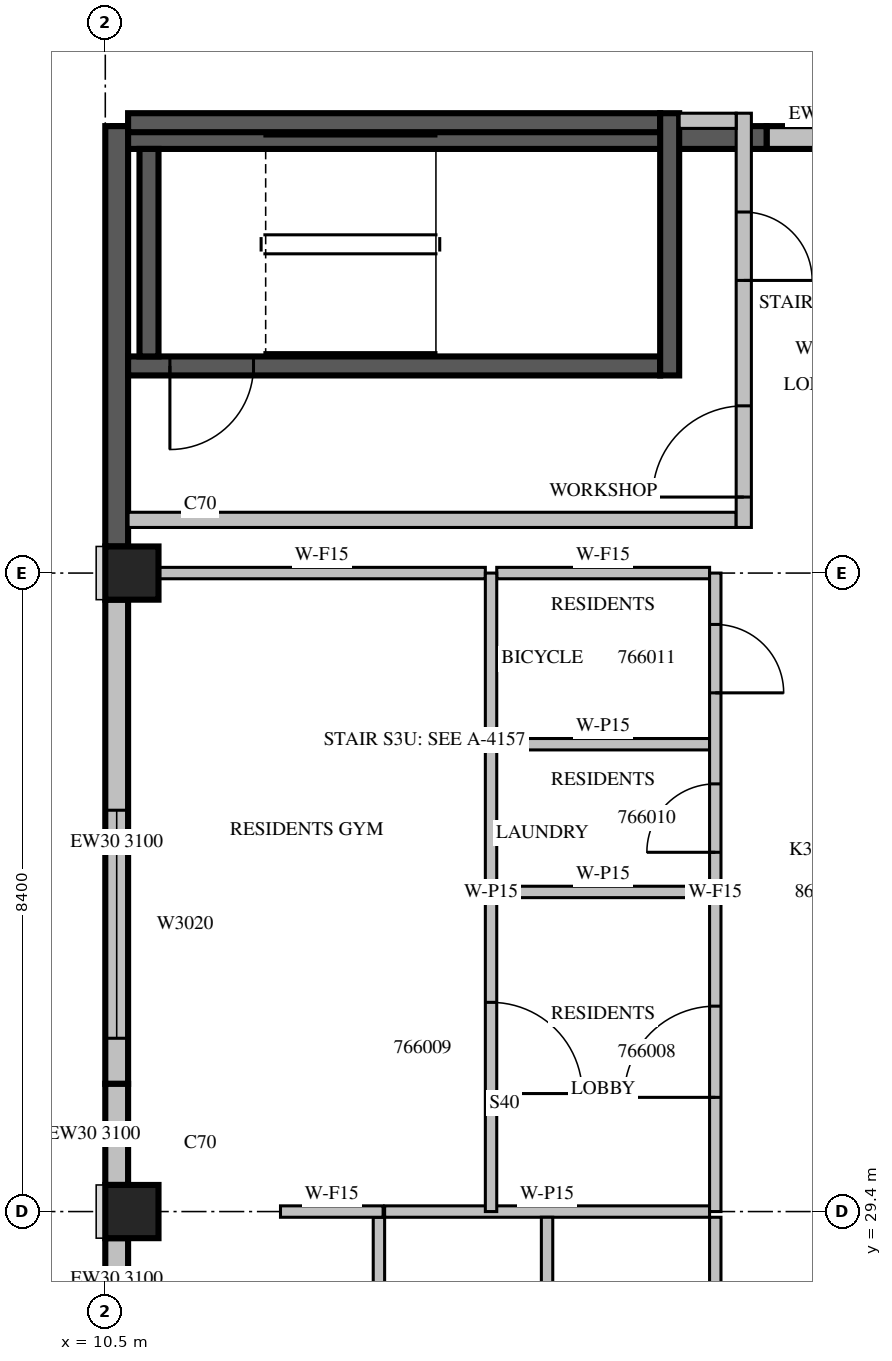
"""IFC4 building model, lengths in metres.
Left out: names, types, materials, properties, quantities, classifications, styles, units other than length and angle.
Written with IfcOpenShell. Run it as: python <this file> out.ifc"""

import sys

from ifc_helpers import new_model, si_unit, direction, frame, frame_2d, origin, origin_2d, place, context, subcontext, project, spatial, rectangle, extrude, source, transform, mapped, element, fill, save


model = new_model("IFC4")
c1 = context("Model", 3, precision=1e-05, world=origin(), true_north=direction((0.0, 1.0)))
c2 = subcontext(c1, "Body", "Model", "MODEL_VIEW")
j1 = project(units=[si_unit("LENGTHUNIT", "METRE"), si_unit("PLANEANGLEUNIT", "RADIAN")], contexts=[c1])
p1 = place(None, origin())
s1 = spatial("IfcSite", under=j1, at=p1, CompositionType="ELEMENT")
p2 = place(p1, origin())
s2 = spatial("IfcBuilding", under=s1, at=p2, CompositionType="ELEMENT")
p3 = place(p2, frame((0.0, 0.0, 291.5)))
s3 = spatial("IfcBuildingStorey", under=s2, at=p3, CompositionType="ELEMENT", Elevation=291.5)
m1 = source(origin(), c2, "Body", "SweptSolid", [
    extrude(rectangle(XDim=0.7, YDim=0.7, at=origin_2d()), origin(), (0.0, 0.0, 1.0), 3.5),
])
for number, where, z_axis, x_axis in (
    (1, (10.85, 29.4, 0.0), (0.0, 0.0, 1.0), (1.0, 0.0, 0.0)),
    (2, (10.85, 37.8, 0.0), (0.0, 0.0, 1.0), (1.0, 0.0, 0.0)),
):
    element("IfcColumn", number, at=place(p3, frame(where, z_axis=z_axis, x_axis=x_axis)), inside=s3, PredefinedType="COLUMN", context=c2, shape_type="MappedRepresentation", body=[
        mapped(m1, transform((0.0, 0.0, 0.0), scale=1.0)),
    ])
m2 = source(origin(), c2, "Body", "SweptSolid", [
    extrude(rectangle(XDim=1.8, YDim=0.3, at=frame_2d((0.9, 0.0))), origin(), (0.0, 0.0, 1.0), 3.1),
])
p4 = place(p3, frame((21.0, 43.53, 0.0), z_axis=(0.0, 0.0, 1.0), x_axis=(-1.0, 0.0, 0.0)))
e3 = element("IfcWall", 3, at=p4, inside=s3, PredefinedType="STANDARD", context=c2, shape_type="MappedRepresentation", body=[
    mapped(m2, transform((0.0, 0.0, 0.0), scale=1.0)),
])
m3 = source(origin(), c2, "Body", "SweptSolid", [
    extrude(rectangle(XDim=8.6, YDim=0.3, at=frame_2d((4.3, 0.0))), origin(), (0.0, 0.0, 1.0), 3.1),
])
p5 = place(p3, frame((19.2, 43.53, 0.0), z_axis=(0.0, 0.0, 1.0), x_axis=(-1.0, 0.0, 0.0)))
e4 = element("IfcWall", 4, at=p5, inside=s3, PredefinedType="SOLIDWALL", context=c2, shape_type="MappedRepresentation", body=[
    mapped(m3, transform((0.0, 0.0, 0.0), scale=1.0)),
])
m4 = source(origin(), c2, "Body", "SweptSolid", [
    extrude(rectangle(XDim=5.53, YDim=0.3, at=frame_2d((2.765, 0.0))), origin(), (0.0, 0.0, 1.0), 3.1),
])
p6 = place(p3, frame((10.65, 43.68, 0.0), z_axis=(0.0, 0.0, 1.0), x_axis=(0.0, -1.0, 0.0)))
e5 = element("IfcWall", 5, at=p6, inside=s3, PredefinedType="SOLIDWALL", context=c2, shape_type="MappedRepresentation", body=[
    mapped(m4, transform((0.0, 0.0, 0.0), scale=1.0)),
])
m5 = source(origin(), c2, "Body", "SweptSolid", [
    extrude(rectangle(XDim=6.37, YDim=0.3, at=frame_2d((3.185, 0.0))), origin(), (0.0, 0.0, 1.0), 3.1),
])
p7 = place(p3, frame((10.65, 37.45, 0.0), z_axis=(0.0, 0.0, 1.0), x_axis=(0.0, -1.0, 0.0)))
e6 = element("IfcWall", 6, at=p7, inside=s3, PredefinedType="STANDARD", context=c2, shape_type="MappedRepresentation", body=[
    mapped(m5, transform((0.0, 0.0, 0.0), scale=1.0)),
])
m6 = source(origin(), c2, "Body", "SweptSolid", [
    extrude(rectangle(XDim=3.0, YDim=2.0, at=frame_2d((1.5, 1.0))), frame((0.0, 0.16, 0.0), z_axis=(0.0, -1.0, 0.0), x_axis=(1.0, 0.0, 0.0)), (0.0, 0.0, 1.0), 0.32),
])
p8 = place(p7, frame((2.77, 0.0, 0.6)))
e7 = element("IfcOpeningElement", 7, at=p8, cuts=e6, PredefinedType="OPENING", context=c2, shape_type="MappedRepresentation", body=[
    mapped(m6, transform((0.0, 0.0, 0.0), scale=1.0)),
])
m7 = source(origin(), c2, "Body", "SweptSolid", [
    extrude(rectangle(XDim=1.33, YDim=0.3, at=frame_2d((0.665, 0.0))), origin(), (0.0, 0.0, 1.0), 3.1),
])
p9 = place(p3, frame((10.65, 31.08, 0.0), z_axis=(0.0, 0.0, 1.0), x_axis=(0.0, -1.0, 0.0)))
e8 = element("IfcWall", 8, at=p9, inside=s3, PredefinedType="STANDARD", context=c2, shape_type="MappedRepresentation", body=[
    mapped(m7, transform((0.0, 0.0, 0.0), scale=1.0)),
])
m8 = source(origin(), c2, "Body", "SweptSolid", [
    extrude(rectangle(XDim=2.17, YDim=0.3, at=frame_2d((1.085, 0.0))), origin(), (0.0, 0.0, 1.0), 3.1),
])
p10 = place(p3, frame((10.65, 29.05, 0.0), z_axis=(0.0, 0.0, 1.0), x_axis=(0.0, -1.0, 0.0)))
e9 = element("IfcWall", 9, at=p10, inside=s3, PredefinedType="STANDARD", context=c2, shape_type="MappedRepresentation", body=[
    mapped(m8, transform((0.0, 0.0, 0.0), scale=1.0)),
])
m9 = source(origin(), c2, "Body", "SweptSolid", [
    extrude(rectangle(XDim=1.2, YDim=2.0, at=frame_2d((0.6, 1.0))), frame((0.0, 0.16, 0.0), z_axis=(0.0, -1.0, 0.0), x_axis=(1.0, 0.0, 0.0)), (0.0, 0.0, 1.0), 0.32),
])
p11 = place(p10, frame((0.485, 0.0, 0.6)))
e10 = element("IfcOpeningElement", 10, at=p11, cuts=e9, PredefinedType="OPENING", context=c2, shape_type="MappedRepresentation", body=[
    mapped(m9, transform((0.0, 0.0, 0.0), scale=1.0)),
])
m10 = source(origin(), c2, "Body", "SweptSolid", [
    extrude(rectangle(XDim=7.0, YDim=0.25, at=frame_2d((3.5, 0.0))), origin(), (0.0, 0.0, 1.0), 3.1),
])
p12 = place(p3, frame((10.8, 40.525, 0.0), z_axis=(0.0, 0.0, 1.0), x_axis=(1.0, 0.0, 0.0)))
e11 = element("IfcWall", 11, at=p12, inside=s3, PredefinedType="SOLIDWALL", context=c2, shape_type="MappedRepresentation", body=[
    mapped(m10, transform((0.0, 0.0, 0.0), scale=1.0)),
])
m11 = source(origin(), c2, "Body", "SweptSolid", [
    extrude(rectangle(XDim=1.1, YDim=2.1, at=frame_2d((0.55, 1.05))), frame((0.0, 0.135, 0.0), z_axis=(0.0, -1.0, 0.0), x_axis=(1.0, 0.0, 0.0)), (0.0, 0.0, 1.0), 0.27),
])
p13 = place(p12, frame((0.55, 0.0, 0.0)))
e12 = element("IfcOpeningElement", 12, at=p13, cuts=e11, PredefinedType="OPENING", context=c2, shape_type="MappedRepresentation", body=[
    mapped(m11, transform((0.0, 0.0, 0.0), scale=1.0)),
])
p14 = place(p3, frame((10.8, 43.725, 0.0), z_axis=(0.0, 0.0, 1.0), x_axis=(1.0, 0.0, 0.0)))
e13 = element("IfcWall", 13, at=p14, inside=s3, PredefinedType="SOLIDWALL", context=c2, shape_type="MappedRepresentation", body=[
    mapped(m10, transform((0.0, 0.0, 0.0), scale=1.0)),
])
m12 = source(origin(), c2, "Body", "SweptSolid", [
    extrude(rectangle(XDim=3.45, YDim=0.25, at=frame_2d((1.725, 0.0))), origin(), (0.0, 0.0, 1.0), 3.1),
])
p15 = place(p3, frame((17.925, 40.4, 0.0), z_axis=(0.0, 0.0, 1.0), x_axis=(0.0, 1.0, 0.0)))
e14 = element("IfcWall", 14, at=p15, inside=s3, PredefinedType="SOLIDWALL", context=c2, shape_type="MappedRepresentation", body=[
    mapped(m12, transform((0.0, 0.0, 0.0), scale=1.0)),
])
m13 = source(origin(), c2, "Body", "SweptSolid", [
    extrude(rectangle(XDim=2.73, YDim=0.25, at=frame_2d((1.365, 0.0))), origin(), (0.0, 0.0, 1.0), 3.1),
])
p16 = place(p3, frame((11.075, 40.65, 0.0), z_axis=(0.0, 0.0, 1.0), x_axis=(0.0, 1.0, 0.0)))
e15 = element("IfcWall", 15, at=p16, inside=s3, PredefinedType="SOLIDWALL", context=c2, shape_type="MappedRepresentation", body=[
    mapped(m13, transform((0.0, 0.0, 0.0), scale=1.0)),
])
m14 = source(origin(), c2, "Body", "SweptSolid", [
    extrude(rectangle(XDim=8.0, YDim=0.2, at=frame_2d((4.0, 0.0))), origin(), (0.0, 0.0, 1.0), 3.1),
])
p17 = place(p3, frame((10.8, 38.5, 0.0), z_axis=(0.0, 0.0, 1.0), x_axis=(1.0, 0.0, 0.0)))
e16 = element("IfcWall", 16, at=p17, inside=s3, PredefinedType="PARTITIONING", context=c2, shape_type="MappedRepresentation", body=[
    mapped(m14, transform((0.0, 0.0, 0.0), scale=1.0)),
])
m15 = source(origin(), c2, "Body", "SweptSolid", [
    extrude(rectangle(XDim=5.45, YDim=0.2, at=frame_2d((2.725, 0.0))), origin(), (0.0, 0.0, 1.0), 3.1),
])
p18 = place(p3, frame((18.9, 38.4, 0.0), z_axis=(0.0, 0.0, 1.0), x_axis=(0.0, 1.0, 0.0)))
e17 = element("IfcWall", 17, at=p18, inside=s3, PredefinedType="PARTITIONING", context=c2, shape_type="MappedRepresentation", body=[
    mapped(m15, transform((0.0, 0.0, 0.0), scale=1.0)),
])
m16 = source(origin(), c2, "Body", "SweptSolid", [
    extrude(rectangle(XDim=1.2, YDim=2.1, at=frame_2d((0.6, 1.05))), frame((0.0, 0.11, 0.0), z_axis=(0.0, -1.0, 0.0), x_axis=(1.0, 0.0, 0.0)), (0.0, 0.0, 1.0), 0.22),
])
p19 = place(p18, frame((0.4, 0.0, 0.0)))
e18 = element("IfcOpeningElement", 18, at=p19, cuts=e17, PredefinedType="OPENING", context=c2, shape_type="MappedRepresentation", body=[
    mapped(m16, transform((0.0, 0.0, 0.0), scale=1.0)),
])
m17 = source(origin(), c2, "Body", "SweptSolid", [
    extrude(rectangle(XDim=0.9, YDim=2.1, at=frame_2d((0.45, 1.05))), frame((0.0, 0.11, 0.0), z_axis=(0.0, -1.0, 0.0), x_axis=(1.0, 0.0, 0.0)), (0.0, 0.0, 1.0), 0.22),
])
p20 = place(p18, frame((3.25, 0.0, 0.0)))
e19 = element("IfcOpeningElement", 19, at=p20, cuts=e17, PredefinedType="OPENING", context=c2, shape_type="MappedRepresentation", body=[
    mapped(m17, transform((0.0, 0.0, 0.0), scale=1.0)),
])
m18 = source(origin(), c2, "Body", "SweptSolid", [
    extrude(rectangle(XDim=0.75, YDim=0.2, at=frame_2d((0.375, 0.0))), origin(), (0.0, 0.0, 1.0), 3.1),
])
p21 = place(p3, frame((18.05, 43.75, 0.0), z_axis=(0.0, 0.0, 1.0), x_axis=(1.0, 0.0, 0.0)))
e20 = element("IfcWall", 20, at=p21, inside=s3, PredefinedType="PARTITIONING", context=c2, shape_type="MappedRepresentation", body=[
    mapped(m18, transform((0.0, 0.0, 0.0), scale=1.0)),
])
m19 = source(origin(), c2, "Body", "SweptSolid", [
    extrude(rectangle(XDim=4.275, YDim=0.15, at=frame_2d((2.138, 0.0))), origin(), (0.0, 0.0, 1.0), 3.1),
])
p22 = place(p3, frame((18.45, 29.4, 0.0), z_axis=(0.0, 0.0, 1.0), x_axis=(-1.0, 0.0, 0.0)))
e21 = element("IfcWall", 21, at=p22, inside=s3, PredefinedType="PARTITIONING", context=c2, shape_type="MappedRepresentation", body=[
    mapped(m19, transform((0.0, 0.0, 0.0), scale=1.0)),
])
m20 = source(origin(), c2, "Body", "SweptSolid", [
    extrude(rectangle(XDim=5.75, YDim=0.15, at=frame_2d((2.875, 0.0))), origin(), (0.0, 0.0, 1.0), 3.1),
])
p23 = place(p3, frame((18.525, 23.575, 0.0), z_axis=(0.0, 0.0, 1.0), x_axis=(0.0, 1.0, 0.0)))
e22 = element("IfcWall", 22, at=p23, inside=s3, PredefinedType="PARTITIONING", context=c2, shape_type="MappedRepresentation", body=[
    mapped(m20, transform((0.0, 0.0, 0.0), scale=1.0)),
])
m21 = source(origin(), c2, "Body", "SweptSolid", [
    extrude(rectangle(XDim=1.0, YDim=2.1, at=frame_2d((0.5, 1.05))), frame((0.0, 0.085, 0.0), z_axis=(0.0, -1.0, 0.0), x_axis=(1.0, 0.0, 0.0)), (0.0, 0.0, 1.0), 0.17),
])
p24 = place(p23, frame((2.375, 0.0, 0.0)))
e23 = element("IfcOpeningElement", 23, at=p24, cuts=e22, PredefinedType="OPENING", context=c2, shape_type="MappedRepresentation", body=[
    mapped(m21, transform((0.0, 0.0, 0.0), scale=1.0)),
])
p25 = place(p3, frame((16.312, 23.575, 0.0), z_axis=(0.0, 0.0, 1.0), x_axis=(0.0, 1.0, 0.0)))
e24 = element("IfcWall", 24, at=p25, inside=s3, PredefinedType="PARTITIONING", context=c2, shape_type="MappedRepresentation", body=[
    mapped(m20, transform((0.0, 0.0, 0.0), scale=1.0)),
])
m22 = source(origin(), c2, "Body", "SweptSolid", [
    extrude(rectangle(XDim=7.725, YDim=0.15, at=frame_2d((3.862, 0.0))), origin(), (0.0, 0.0, 1.0), 3.1),
])
p26 = place(p3, frame((14.1, 29.325, 0.0), z_axis=(0.0, 0.0, 1.0), x_axis=(0.0, -1.0, 0.0)))
e25 = element("IfcWall", 25, at=p26, inside=s3, PredefinedType="PARTITIONING", context=c2, shape_type="MappedRepresentation", body=[
    mapped(m22, transform((0.0, 0.0, 0.0), scale=1.0)),
])
p27 = place(p26, frame((6.275, 0.0, 0.0)))
e26 = element("IfcOpeningElement", 26, at=p27, cuts=e25, PredefinedType="OPENING", context=c2, shape_type="MappedRepresentation", body=[
    mapped(m21, transform((0.0, 0.0, 0.0), scale=1.0)),
])
p28 = place(p3, frame((18.45, 33.605, 0.0), z_axis=(0.0, 0.0, 1.0), x_axis=(-1.0, 0.0, 0.0)))
e27 = element("IfcWall", 27, at=p28, inside=s3, PredefinedType="PARTITIONING", context=c2, shape_type="SweptSolid", body=[
    extrude(rectangle(XDim=2.8, YDim=0.15, at=frame_2d((1.4, 0.0))), origin(), (0.0, 0.0, 1.0), 3.1),
])
m23 = source(origin(), c2, "Body", "SweptSolid", [
    extrude(rectangle(XDim=2.8, YDim=0.15, at=frame_2d((1.4, 0.0))), origin(), (0.0, 0.0, 1.0), 3.1),
])
p29 = place(p3, frame((18.45, 35.548, 0.0), z_axis=(0.0, 0.0, 1.0), x_axis=(-1.0, 0.0, 0.0)))
e28 = element("IfcWall", 28, at=p29, inside=s3, PredefinedType="PARTITIONING", context=c2, shape_type="MappedRepresentation", body=[
    mapped(m23, transform((0.0, 0.0, 0.0), scale=1.0)),
])
m24 = source(origin(), c2, "Body", "SweptSolid", [
    extrude(rectangle(XDim=1.35, YDim=0.15, at=frame_2d((0.675, 0.0))), origin(), (0.0, 0.0, 1.0), 3.1),
])
p30 = place(p3, frame((14.155, 29.4, 0.0), z_axis=(0.0, 0.0, 1.0), x_axis=(-1.0, 0.0, 0.0)))
e29 = element("IfcWall", 29, at=p30, inside=s3, PredefinedType="PARTITIONING", context=c2, shape_type="MappedRepresentation", body=[
    mapped(m24, transform((0.0, 0.0, 0.0), scale=1.0)),
])
m25 = source(origin(), c2, "Body", "SweptSolid", [
    extrude(rectangle(XDim=4.301, YDim=0.15, at=frame_2d((2.151, 0.0))), origin(), (0.0, 0.0, 1.0), 3.1),
])
p31 = place(p3, frame((15.5, 37.8, 0.0), z_axis=(0.0, 0.0, 1.0), x_axis=(-1.0, 0.0, 0.0)))
e30 = element("IfcWall", 30, at=p31, inside=s3, PredefinedType="PARTITIONING", context=c2, shape_type="MappedRepresentation", body=[
    mapped(m25, transform((0.0, 0.0, 0.0), scale=1.0)),
])
p32 = place(p3, frame((18.45, 37.8, 0.0), z_axis=(0.0, 0.0, 1.0), x_axis=(-1.0, 0.0, 0.0)))
e31 = element("IfcWall", 31, at=p32, inside=s3, PredefinedType="PARTITIONING", context=c2, shape_type="MappedRepresentation", body=[
    mapped(m23, transform((0.0, 0.0, 0.0), scale=1.0)),
])
m26 = source(origin(), c2, "Body", "SweptSolid", [
    extrude(rectangle(XDim=8.4, YDim=0.15, at=frame_2d((4.2, 0.0))), origin(), (0.0, 0.0, 1.0), 3.1),
])
p33 = place(p3, frame((15.575, 29.4, 0.0), z_axis=(0.0, 0.0, 1.0), x_axis=(0.0, 1.0, 0.0)))
e32 = element("IfcWall", 32, at=p33, inside=s3, PredefinedType="PARTITIONING", context=c2, shape_type="MappedRepresentation", body=[
    mapped(m26, transform((0.0, 0.0, 0.0), scale=1.0)),
])
m27 = source(origin(), c2, "Body", "SweptSolid", [
    extrude(rectangle(XDim=1.2, YDim=2.1, at=frame_2d((0.6, 1.05))), frame((0.0, 0.085, 0.0), z_axis=(0.0, -1.0, 0.0), x_axis=(1.0, 0.0, 0.0)), (0.0, 0.0, 1.0), 0.17),
])
p34 = place(p33, frame((1.552, 0.0, 0.0)))
e33 = element("IfcOpeningElement", 33, at=p34, cuts=e32, PredefinedType="OPENING", context=c2, shape_type="MappedRepresentation", body=[
    mapped(m27, transform((0.0, 0.0, 0.0), scale=1.0)),
])
p35 = place(p3, frame((18.525, 29.4, 0.0), z_axis=(0.0, 0.0, 1.0), x_axis=(0.0, 1.0, 0.0)))
e34 = element("IfcWall", 34, at=p35, inside=s3, PredefinedType="PARTITIONING", context=c2, shape_type="MappedRepresentation", body=[
    mapped(m26, transform((0.0, 0.0, 0.0), scale=1.0)),
])
p36 = place(p35, frame((1.502, 0.0, 0.0)))
e35 = element("IfcOpeningElement", 35, at=p36, cuts=e34, PredefinedType="OPENING", context=c2, shape_type="MappedRepresentation", body=[
    mapped(m27, transform((0.0, 0.0, 0.0), scale=1.0)),
])
m28 = source(origin(), c2, "Body", "SweptSolid", [
    extrude(rectangle(XDim=0.9, YDim=2.1, at=frame_2d((0.45, 1.05))), frame((0.0, 0.085, 0.0), z_axis=(0.0, -1.0, 0.0), x_axis=(1.0, 0.0, 0.0)), (0.0, 0.0, 1.0), 0.17),
])
p37 = place(p35, frame((4.727, 0.0, 0.0)))
e36 = element("IfcOpeningElement", 36, at=p37, cuts=e34, PredefinedType="OPENING", context=c2, shape_type="MappedRepresentation", body=[
    mapped(m28, transform((0.0, 0.0, 0.0), scale=1.0)),
])
p38 = place(p35, frame((6.824, 0.0, 0.0)))
e37 = element("IfcOpeningElement", 37, at=p38, cuts=e34, PredefinedType="OPENING", context=c2, shape_type="MappedRepresentation", body=[
    mapped(m28, transform((0.0, 0.0, 0.0), scale=1.0)),
])
m29 = source(origin(), c2, "Body", "SweptSolid", [
    extrude(rectangle(XDim=3.0, YDim=2.0, at=frame_2d((1.5, 1.0))), frame((0.0, 0.03, 0.0), z_axis=(0.0, -1.0, 0.0), x_axis=(1.0, 0.0, 0.0)), (0.0, 0.0, 1.0), 0.06),
])
p39 = place(p8, origin())
e38 = element("IfcWindow", 38, at=p39, inside=s3, PartitioningType="SINGLE_PANEL", PredefinedType="WINDOW", context=c2, shape_type="MappedRepresentation", body=[
    mapped(m29, transform((0.0, 0.0, 0.0), scale=1.0)),
])
fill(e7, e38)
m30 = source(origin(), c2, "Body", "SweptSolid", [
    extrude(rectangle(XDim=1.2, YDim=2.0, at=frame_2d((0.6, 1.0))), frame((0.0, 0.03, 0.0), z_axis=(0.0, -1.0, 0.0), x_axis=(1.0, 0.0, 0.0)), (0.0, 0.0, 1.0), 0.06),
])
p40 = place(p11, origin())
e39 = element("IfcWindow", 39, at=p40, inside=s3, PartitioningType="SINGLE_PANEL", PredefinedType="WINDOW", context=c2, shape_type="MappedRepresentation", body=[
    mapped(m30, transform((0.0, 0.0, 0.0), scale=1.0)),
])
fill(e10, e39)
m31 = source(origin(), c2, "Body", "SweptSolid", [
    extrude(rectangle(XDim=1.1, YDim=2.1, at=frame_2d((0.55, 1.05))), frame((0.0, 0.025, 0.0), z_axis=(0.0, -1.0, 0.0), x_axis=(1.0, 0.0, 0.0)), (0.0, 0.0, 1.0), 0.05),
])
p41 = place(p13, origin())
e40 = element("IfcDoor", 40, at=p41, inside=s3, OperationType="SINGLE_SWING_RIGHT", PredefinedType="DOOR", context=c2, shape_type="MappedRepresentation", body=[
    mapped(m31, transform((0.0, 0.0, 0.0), scale=1.0)),
])
fill(e12, e40)
m32 = source(origin(), c2, "Body", "SweptSolid", [
    extrude(rectangle(XDim=1.2, YDim=2.1, at=frame_2d((0.6, 1.05))), frame((0.0, 0.025, 0.0), z_axis=(0.0, -1.0, 0.0), x_axis=(1.0, 0.0, 0.0)), (0.0, 0.0, 1.0), 0.05),
])
p42 = place(p19, origin())
e41 = element("IfcDoor", 41, at=p42, inside=s3, OperationType="SINGLE_SWING_LEFT", PredefinedType="DOOR", context=c2, shape_type="MappedRepresentation", body=[
    mapped(m32, transform((0.0, 0.0, 0.0), scale=1.0)),
])
fill(e18, e41)
m33 = source(origin(), c2, "Body", "SweptSolid", [
    extrude(rectangle(XDim=0.9, YDim=2.1, at=frame_2d((0.45, 1.05))), frame((0.0, 0.025, 0.0), z_axis=(0.0, -1.0, 0.0), x_axis=(1.0, 0.0, 0.0)), (0.0, 0.0, 1.0), 0.05),
])
p43 = place(p20, origin())
e42 = element("IfcDoor", 42, at=p43, inside=s3, OperationType="SINGLE_SWING_RIGHT", PredefinedType="DOOR", context=c2, shape_type="MappedRepresentation", body=[
    mapped(m33, transform((0.0, 0.0, 0.0), scale=1.0)),
])
fill(e19, e42)
p44 = place(p36, origin())
e43 = element("IfcDoor", 43, at=p44, inside=s3, OperationType="SINGLE_SWING_LEFT", PredefinedType="DOOR", context=c2, shape_type="MappedRepresentation", body=[
    mapped(m32, transform((0.0, 0.0, 0.0), scale=1.0)),
])
fill(e35, e43)
p45 = place(p34, origin())
e44 = element("IfcDoor", 44, at=p45, inside=s3, OperationType="SINGLE_SWING_RIGHT", PredefinedType="DOOR", context=c2, shape_type="MappedRepresentation", body=[
    mapped(m32, transform((0.0, 0.0, 0.0), scale=1.0)),
])
fill(e33, e44)
p46 = place(p37, origin())
e45 = element("IfcDoor", 45, at=p46, inside=s3, OperationType="SINGLE_SWING_LEFT", PredefinedType="DOOR", context=c2, shape_type="MappedRepresentation", body=[
    mapped(m33, transform((0.0, 0.0, 0.0), scale=1.0)),
])
fill(e36, e45)
p47 = place(p38, origin())
e46 = element("IfcDoor", 46, at=p47, inside=s3, OperationType="SINGLE_SWING_RIGHT", PredefinedType="DOOR", context=c2, shape_type="MappedRepresentation", body=[
    mapped(m33, transform((0.0, 0.0, 0.0), scale=1.0)),
])
fill(e37, e46)
save(model, sys.argv[1])
